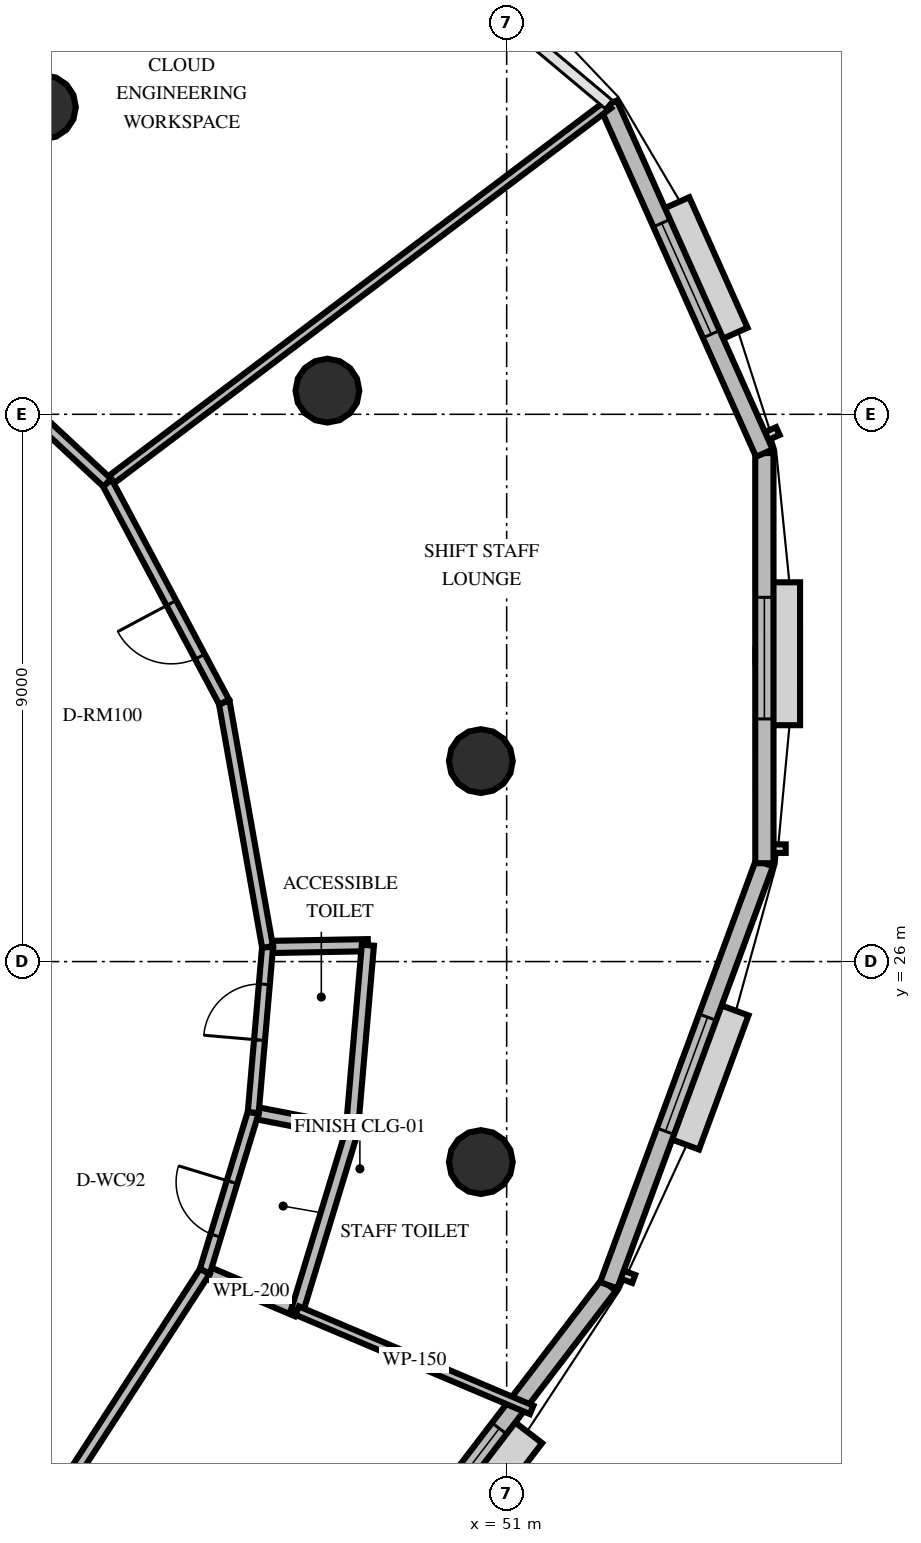
"""IFC4 building model, lengths in metres.
Left out: names, types, materials, properties, quantities, classifications, styles, units other than length and angle.
Written with IfcOpenShell. Run it as: python <this file> out.ifc"""

import sys

from ifc_helpers import new_model, si_unit, direction, frame, frame_2d, origin, origin_2d, place, context, subcontext, project, spatial, rectangle, circle, extrude, element, fill, save


model = new_model("IFC4")
c1 = context("Model", 3, precision=1e-05, world=origin(), true_north=direction((0.0, 1.0)))
c2 = subcontext(c1, "Body", "Model", "MODEL_VIEW")
j1 = project(units=[si_unit("LENGTHUNIT", "METRE"), si_unit("PLANEANGLEUNIT", "RADIAN")], contexts=[c1])
p1 = place(None, origin())
s1 = spatial("IfcSite", under=j1, at=p1, CompositionType="ELEMENT")
p2 = place(p1, origin())
s2 = spatial("IfcBuilding", under=s1, at=p2, CompositionType="ELEMENT")
p3 = place(p2, frame((0.0, 0.0, 188.0)))
s3 = spatial("IfcBuildingStorey", under=s2, at=p3, CompositionType="ELEMENT", Elevation=188.0)
for number, where, z_axis, x_axis in (
    (1, (50.575, 29.297, 0.0), (0.0, 0.0, 1.0), (1.0, 0.0, 0.0)),
    (2, (48.052, 35.389, 0.0), (0.0, 0.0, 1.0), (1.0, 0.0, 0.0)),
    (3, (43.389, 40.052, 0.0), (0.0, 0.0, 1.0), (1.0, 0.0, 0.0)),
    (4, (50.575, 22.703, 0.0), (0.0, 0.0, 1.0), (1.0, 0.0, 0.0)),
):
    element("IfcColumn", number, at=place(p3, frame(where, z_axis=z_axis, x_axis=x_axis)), inside=s3, PredefinedType="COLUMN", context=c2, shape_type="SweptSolid", body=[
        extrude(circle(Radius=0.525, at=origin_2d()), origin(), (0.0, 0.0, 1.0), 3.6),
    ])
p4 = place(p3, frame((47.864, 14.379, 0.0), z_axis=(0.0, 0.0, 1.0), x_axis=(0.607272903693, 0.794493310507, 0.0)))
e5 = element("IfcWall", 5, at=p4, inside=s3, PredefinedType="SOLIDWALL", context=c2, shape_type="SweptSolid", body=[
    extrude(rectangle(XDim=7.927, YDim=0.3, at=frame_2d((3.964, 0.0))), origin(), (0.0, 0.0, 1.0), 2.66),
])
p5 = place(p4, frame((2.964, 0.0, 0.8)))
e6 = element("IfcOpeningElement", 6, at=p5, cuts=e5, PredefinedType="OPENING", context=c2, shape_type="SweptSolid", body=[
    extrude(rectangle(XDim=2.0, YDim=1.85, at=frame_2d((1.0, 0.925))), frame((0.0, 0.16, 0.0), z_axis=(0.0, -1.0, 0.0), x_axis=(1.0, 0.0, 0.0)), (0.0, 0.0, 1.0), 0.32),
])
p6 = place(p3, frame((52.678, 20.677, 0.0), z_axis=(0.0, 0.0, 1.0), x_axis=(0.346206962983, 0.938158162989, 0.0)))
e7 = element("IfcWall", 7, at=p6, inside=s3, PredefinedType="SOLIDWALL", context=c2, shape_type="SweptSolid", body=[
    extrude(rectangle(XDim=7.397, YDim=0.3, at=frame_2d((3.699, 0.0))), origin(), (0.0, 0.0, 1.0), 2.66),
])
p7 = place(p6, frame((2.699, 0.0, 0.8)))
e8 = element("IfcOpeningElement", 8, at=p7, cuts=e7, PredefinedType="OPENING", context=c2, shape_type="SweptSolid", body=[
    extrude(rectangle(XDim=2.0, YDim=1.85, at=frame_2d((1.0, 0.925))), frame((0.0, 0.16, 0.0), z_axis=(0.0, -1.0, 0.0), x_axis=(1.0, 0.0, 0.0)), (0.0, 0.0, 1.0), 0.32),
])
p8 = place(p3, frame((55.239, 27.617, 0.0), z_axis=(0.0, 0.0, 1.0), x_axis=(-0.000108585492, 0.999999994105, 0.0)))
e9 = element("IfcWall", 9, at=p8, inside=s3, PredefinedType="SOLIDWALL", context=c2, shape_type="SweptSolid", body=[
    extrude(rectangle(XDim=6.745, YDim=0.3, at=frame_2d((3.373, 0.0))), origin(), (0.0, 0.0, 1.0), 2.66),
])
p9 = place(p8, frame((2.373, 0.0, 0.8)))
e10 = element("IfcOpeningElement", 10, at=p9, cuts=e9, PredefinedType="OPENING", context=c2, shape_type="SweptSolid", body=[
    extrude(rectangle(XDim=2.0, YDim=1.85, at=frame_2d((1.0, 0.925))), frame((0.0, 0.16, 0.0), z_axis=(0.0, -1.0, 0.0), x_axis=(1.0, 0.0, 0.0)), (0.0, 0.0, 1.0), 0.32),
])
p10 = place(p3, frame((55.238, 34.362, 0.0), z_axis=(0.0, 0.0, 1.0), x_axis=(-0.407853912848, 0.913047197999, 0.0)))
e11 = element("IfcWall", 11, at=p10, inside=s3, PredefinedType="SOLIDWALL", context=c2, shape_type="SweptSolid", body=[
    extrude(rectangle(XDim=6.283, YDim=0.3, at=frame_2d((3.142, 0.0))), origin(), (0.0, 0.0, 1.0), 2.66),
])
p11 = place(p10, frame((2.141, 0.0, 0.8)))
e12 = element("IfcOpeningElement", 12, at=p11, cuts=e11, PredefinedType="OPENING", context=c2, shape_type="SweptSolid", body=[
    extrude(rectangle(XDim=2.0, YDim=1.85, at=frame_2d((1.0, 0.925))), frame((0.0, 0.16, 0.0), z_axis=(0.0, -1.0, 0.0), x_axis=(1.0, 0.0, 0.0)), (0.0, 0.0, 1.0), 0.32),
])
for number, where, z_axis, x_axis in (
    (13, (46.035, 20.904, 0.0), (0.0, 0.0, 1.0), (0.921, -0.39, 0.0)),
    (14, (46.832, 23.517, 0.0), (0.0, 0.0, 1.0), (0.982, -0.19, 0.0)),
):
    element("IfcWall", number, at=place(p3, frame(where, z_axis=z_axis, x_axis=x_axis)), inside=s3, PredefinedType="PLUMBINGWALL", context=c2, shape_type="SweptSolid", body=[
        extrude(rectangle(XDim=1.65, YDim=0.2, at=frame_2d((0.825, 0.0))), origin(), (0.0, 0.0, 1.0), 2.46),
    ])
p12 = place(p3, frame((47.555, 20.26, 0.0), z_axis=(0.0, 0.0, 1.0), x_axis=(0.291559368101, 0.956552735019, 0.0)))
e15 = element("IfcWall", 15, at=p12, inside=s3, PredefinedType="PLUMBINGWALL", context=c2, shape_type="SweptSolid", body=[
    extrude(rectangle(XDim=3.077, YDim=0.2, at=frame_2d((1.539, 0.0))), origin(), (0.0, 0.0, 1.0), 2.46),
])
p13 = place(p3, frame((46.035, 20.904, 0.0), z_axis=(0.0, 0.0, 1.0), x_axis=(0.291542016716, 0.956558023587, 0.0)))
e16 = element("IfcWall", 16, at=p13, inside=s3, PredefinedType="PARTITIONING", context=c2, shape_type="SweptSolid", body=[
    extrude(rectangle(XDim=2.732, YDim=0.18, at=frame_2d((1.366, 0.0))), origin(), (0.0, 0.0, 1.0), 2.46),
])
p14 = place(p13, frame((0.616, 0.0, 0.0)))
e17 = element("IfcOpeningElement", 17, at=p14, cuts=e16, PredefinedType="OPENING", context=c2, shape_type="SweptSolid", body=[
    extrude(rectangle(XDim=0.92, YDim=2.1, at=frame_2d((0.46, 1.05))), frame((0.0, 0.1, 0.0), z_axis=(0.0, -1.0, 0.0), x_axis=(1.0, 0.0, 0.0)), (0.0, 0.0, 1.0), 0.2),
])
p15 = place(p3, frame((47.068, 26.24, 0.0), z_axis=(0.0, 0.0, 1.0), x_axis=(0.999831656691, 0.018348250027, 0.0)))
e18 = element("IfcWall", 18, at=p15, inside=s3, PredefinedType="PLUMBINGWALL", context=c2, shape_type="SweptSolid", body=[
    extrude(rectangle(XDim=1.65, YDim=0.2, at=frame_2d((0.825, 0.0))), origin(), (0.0, 0.0, 1.0), 2.46),
])
p16 = place(p3, frame((48.452, 23.204, 0.0), z_axis=(0.0, 0.0, 1.0), x_axis=(0.086314660214, 0.996267925526, 0.0)))
e19 = element("IfcWall", 19, at=p16, inside=s3, PredefinedType="PLUMBINGWALL", context=c2, shape_type="SweptSolid", body=[
    extrude(rectangle(XDim=3.077, YDim=0.2, at=frame_2d((1.539, 0.0))), origin(), (0.0, 0.0, 1.0), 2.46),
])
p17 = place(p3, frame((46.832, 23.517, 0.0), z_axis=(0.0, 0.0, 1.0), x_axis=(0.086313445535, 0.996268030763, 0.0)))
e20 = element("IfcWall", 20, at=p17, inside=s3, PredefinedType="PARTITIONING", context=c2, shape_type="SweptSolid", body=[
    extrude(rectangle(XDim=2.732, YDim=0.18, at=frame_2d((1.366, 0.0))), origin(), (0.0, 0.0, 1.0), 2.46),
])
p18 = place(p17, frame((1.197, 0.0, 0.0)))
e21 = element("IfcOpeningElement", 21, at=p18, cuts=e20, PredefinedType="OPENING", context=c2, shape_type="SweptSolid", body=[
    extrude(rectangle(XDim=0.92, YDim=2.1, at=frame_2d((0.46, 1.05))), frame((0.0, 0.1, 0.0), z_axis=(0.0, -1.0, 0.0), x_axis=(1.0, 0.0, 0.0)), (0.0, 0.0, 1.0), 0.2),
])
p19 = place(p3, frame((47.555, 20.26, 0.0), z_axis=(0.0, 0.0, 1.0), x_axis=(0.920843282416, -0.389932877852, 0.0)))
e22 = element("IfcWall", 22, at=p19, inside=s3, PredefinedType="PARTITIONING", context=c2, shape_type="SweptSolid", body=[
    extrude(rectangle(XDim=4.188, YDim=0.15, at=frame_2d((2.094, 0.0))), origin(), (0.0, 0.0, 1.0), 2.46),
])
p20 = place(p3, frame((44.431, 33.875, 0.0), z_axis=(0.0, 0.0, 1.0), x_axis=(0.798098657552, 0.602526790122, 0.0)))
e23 = element("IfcWall", 23, at=p20, inside=s3, PredefinedType="PARTITIONING", context=c2, shape_type="SweptSolid", body=[
    extrude(rectangle(XDim=10.33, YDim=0.15, at=frame_2d((5.165, 0.0))), origin(), (0.0, 0.0, 1.0), 2.46),
])
p21 = place(p3, frame((47.068, 26.24, 0.0), z_axis=(0.0, 0.0, 1.0), x_axis=(-0.174507314031, 0.984655877629, 0.0)))
e24 = element("IfcWall", 24, at=p21, inside=s3, PredefinedType="PARTITIONING", context=c2, shape_type="SweptSolid", body=[
    extrude(rectangle(XDim=4.089, YDim=0.18, at=frame_2d((2.045, 0.0))), origin(), (0.0, 0.0, 1.0), 2.46),
])
p22 = place(p3, frame((46.354, 30.266, 0.0), z_axis=(0.0, 0.0, 1.0), x_axis=(-0.470253510843, 0.882531379351, 0.0)))
e25 = element("IfcWall", 25, at=p22, inside=s3, PredefinedType="PARTITIONING", context=c2, shape_type="SweptSolid", body=[
    extrude(rectangle(XDim=4.089, YDim=0.18, at=frame_2d((2.044, 0.0))), origin(), (0.0, 0.0, 1.0), 2.46),
])
p23 = place(p22, frame((0.847, 0.0, 0.0)))
e26 = element("IfcOpeningElement", 26, at=p23, cuts=e25, PredefinedType="OPENING", context=c2, shape_type="SweptSolid", body=[
    extrude(rectangle(XDim=1.0, YDim=2.15, at=frame_2d((0.5, 1.075))), frame((0.0, 0.1, 0.0), z_axis=(0.0, -1.0, 0.0), x_axis=(1.0, 0.0, 0.0)), (0.0, 0.0, 1.0), 0.2),
])
p24 = place(p3, frame((44.431, 33.875, 0.0), z_axis=(0.0, 0.0, 1.0), x_axis=(-0.731959643507, 0.681347987652, 0.0)))
e27 = element("IfcWall", 27, at=p24, inside=s3, PredefinedType="PARTITIONING", context=c2, shape_type="SweptSolid", body=[
    extrude(rectangle(XDim=4.539, YDim=0.18, at=frame_2d((2.27, 0.0))), origin(), (0.0, 0.0, 1.0), 2.46),
])
p25 = place(p3, frame((43.567, 17.094, 0.0), z_axis=(0.0, 0.0, 1.0), x_axis=(0.543880023755, 0.839162987601, 0.0)))
e28 = element("IfcWall", 28, at=p25, inside=s3, PredefinedType="PARTITIONING", context=c2, shape_type="SweptSolid", body=[
    extrude(rectangle(XDim=4.539, YDim=0.18, at=frame_2d((2.27, 0.0))), origin(), (0.0, 0.0, 1.0), 2.46),
])
p26 = place(p5, origin())
e29 = element("IfcWindow", 29, at=p26, inside=s3, PartitioningType="SINGLE_PANEL", PredefinedType="WINDOW", context=c2, shape_type="SweptSolid", body=[
    extrude(rectangle(XDim=2.0, YDim=1.85, at=frame_2d((1.0, 0.925))), frame((0.0, 0.03, 0.0), z_axis=(0.0, -1.0, 0.0), x_axis=(1.0, 0.0, 0.0)), (0.0, 0.0, 1.0), 0.06),
])
fill(e6, e29)
p27 = place(p7, origin())
e30 = element("IfcWindow", 30, at=p27, inside=s3, PartitioningType="SINGLE_PANEL", PredefinedType="WINDOW", context=c2, shape_type="SweptSolid", body=[
    extrude(rectangle(XDim=2.0, YDim=1.85, at=frame_2d((1.0, 0.925))), frame((0.0, 0.03, 0.0), z_axis=(0.0, -1.0, 0.0), x_axis=(1.0, 0.0, 0.0)), (0.0, 0.0, 1.0), 0.06),
])
fill(e8, e30)
p28 = place(p9, origin())
e31 = element("IfcWindow", 31, at=p28, inside=s3, PartitioningType="SINGLE_PANEL", PredefinedType="WINDOW", context=c2, shape_type="SweptSolid", body=[
    extrude(rectangle(XDim=2.0, YDim=1.85, at=frame_2d((1.0, 0.925))), frame((0.0, 0.03, 0.0), z_axis=(0.0, -1.0, 0.0), x_axis=(1.0, 0.0, 0.0)), (0.0, 0.0, 1.0), 0.06),
])
fill(e10, e31)
p29 = place(p11, origin())
e32 = element("IfcWindow", 32, at=p29, inside=s3, PartitioningType="SINGLE_PANEL", PredefinedType="WINDOW", context=c2, shape_type="SweptSolid", body=[
    extrude(rectangle(XDim=2.0, YDim=1.85, at=frame_2d((1.0, 0.925))), frame((0.0, 0.03, 0.0), z_axis=(0.0, -1.0, 0.0), x_axis=(1.0, 0.0, 0.0)), (0.0, 0.0, 1.0), 0.06),
])
fill(e12, e32)
p30 = place(p14, origin())
e33 = element("IfcDoor", 33, at=p30, inside=s3, OperationType="SINGLE_SWING_RIGHT", PredefinedType="DOOR", context=c2, shape_type="SweptSolid", body=[
    extrude(rectangle(XDim=0.92, YDim=2.1, at=frame_2d((0.46, 1.05))), frame((0.0, 0.025, 0.0), z_axis=(0.0, -1.0, 0.0), x_axis=(1.0, 0.0, 0.0)), (0.0, 0.0, 1.0), 0.05),
])
fill(e17, e33)
p31 = place(p18, origin())
e34 = element("IfcDoor", 34, at=p31, inside=s3, OperationType="SINGLE_SWING_LEFT", PredefinedType="DOOR", context=c2, shape_type="SweptSolid", body=[
    extrude(rectangle(XDim=0.92, YDim=2.1, at=frame_2d((0.46, 1.05))), frame((0.0, 0.025, 0.0), z_axis=(0.0, -1.0, 0.0), x_axis=(1.0, 0.0, 0.0)), (0.0, 0.0, 1.0), 0.05),
])
fill(e21, e34)
p32 = place(p23, origin())
e35 = element("IfcDoor", 35, at=p32, inside=s3, OperationType="SINGLE_SWING_RIGHT", PredefinedType="DOOR", context=c2, shape_type="SweptSolid", body=[
    extrude(rectangle(XDim=1.0, YDim=2.15, at=frame_2d((0.5, 1.075))), frame((0.0, 0.025, 0.0), z_axis=(0.0, -1.0, 0.0), x_axis=(1.0, 0.0, 0.0)), (0.0, 0.0, 1.0), 0.05),
])
fill(e26, e35)
save(model, sys.argv[1])
